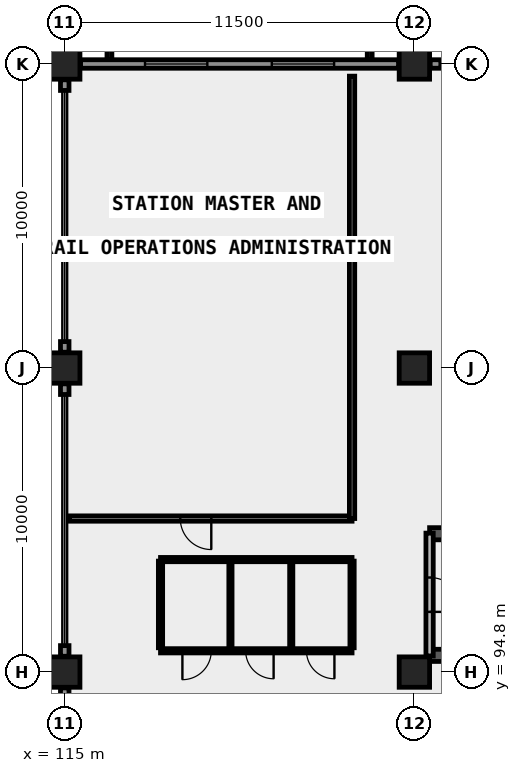
"""IFC4 building model, lengths in metres.
Left out: names, types, materials, properties, quantities, classifications, styles, units other than length and angle.
Written with IfcOpenShell. Run it as: python <this file> out.ifc"""

import sys

from ifc_helpers import new_model, si_unit, direction, frame, frame_2d, origin, origin_2d, place, context, subcontext, project, spatial, rectangle, extrude, element, fill, save


model = new_model("IFC4")
c1 = context("Model", 3, precision=1e-05, world=origin(), true_north=direction((0.0, 1.0)))
c2 = subcontext(c1, "Body", "Model", "MODEL_VIEW")
j1 = project(units=[si_unit("LENGTHUNIT", "METRE"), si_unit("PLANEANGLEUNIT", "RADIAN")], contexts=[c1])
p1 = place(None, origin())
s1 = spatial("IfcSite", under=j1, at=p1, CompositionType="ELEMENT")
p2 = place(p1, origin())
s2 = spatial("IfcBuilding", under=s1, at=p2, CompositionType="ELEMENT")
p3 = place(p2, frame((0.0, 0.0, 13.8)))
s3 = spatial("IfcBuildingStorey", under=s2, at=p3, CompositionType="ELEMENT", Elevation=13.8)
for number, where, z_axis, x_axis in (
    (1, (115.0, 94.8, 0.0), (0.0, 0.0, 1.0), (1.0, 0.0, 0.0)),
    (2, (115.0, 104.8, 0.0), (0.0, 0.0, 1.0), (1.0, 0.0, 0.0)),
    (3, (115.0, 114.8, 0.0), (0.0, 0.0, 1.0), (1.0, 0.0, 0.0)),
    (4, (126.5, 94.8, 0.0), (0.0, 0.0, 1.0), (1.0, 0.0, 0.0)),
    (5, (126.5, 104.8, 0.0), (0.0, 0.0, 1.0), (1.0, 0.0, 0.0)),
    (6, (126.5, 114.8, 0.0), (0.0, 0.0, 1.0), (1.0, 0.0, 0.0)),
):
    element("IfcColumn", number, at=place(p3, frame(where, z_axis=z_axis, x_axis=x_axis)), inside=s3, PredefinedType="COLUMN", context=c2, shape_type="SweptSolid", body=[
        extrude(rectangle(XDim=1.0, YDim=1.0, at=origin_2d()), origin(), (0.0, 0.0, 1.0), 4.5),
    ])
p4 = place(p3, frame((127.0, 95.35, 0.0), z_axis=(0.0, 0.0, 1.0), x_axis=(1.0, 0.0, 0.0)))
e7 = element("IfcWall", 7, at=p4, inside=s3, PredefinedType="SHEAR", context=c2, shape_type="SweptSolid", body=[
    extrude(rectangle(XDim=9.15, YDim=0.4, at=frame_2d((4.575, 0.0))), origin(), (0.0, 0.0, 1.0), 4.5),
])
p5 = place(p3, frame((127.0, 99.35, 0.0), z_axis=(0.0, 0.0, 1.0), x_axis=(1.0, 0.0, 0.0)))
e8 = element("IfcWall", 8, at=p5, inside=s3, PredefinedType="SHEAR", context=c2, shape_type="SweptSolid", body=[
    extrude(rectangle(XDim=9.15, YDim=0.4, at=frame_2d((4.575, 0.0))), origin(), (0.0, 0.0, 1.0), 4.5),
])
p6 = place(p5, frame((0.55, 0.0, 0.0)))
e9 = element("IfcOpeningElement", 9, at=p6, cuts=e8, PredefinedType="OPENING", context=c2, shape_type="SweptSolid", body=[
    extrude(rectangle(XDim=1.13, YDim=2.15, at=frame_2d((0.565, 1.075))), frame((0.0, 0.21, 0.0), z_axis=(0.0, -1.0, 0.0), x_axis=(1.0, 0.0, 0.0)), (0.0, 0.0, 1.0), 0.42),
])
p7 = place(p3, frame((115.52, 114.8, 0.0), z_axis=(0.0, 0.0, 1.0), x_axis=(1.0, 0.0, 0.0)))
e10 = element("IfcWall", 10, at=p7, inside=s3, PredefinedType="SOLIDWALL", context=c2, shape_type="SweptSolid", body=[
    extrude(rectangle(XDim=10.46, YDim=0.28, at=frame_2d((5.23, 0.0))), origin(), (0.0, 0.0, 1.0), 3.45),
])
p8 = place(p7, frame((2.12, 0.0, 0.85)))
e11 = element("IfcOpeningElement", 11, at=p8, cuts=e10, PredefinedType="OPENING", context=c2, shape_type="SweptSolid", body=[
    extrude(rectangle(XDim=2.05, YDim=1.9, at=frame_2d((1.025, 0.95))), frame((0.0, 0.15, 0.0), z_axis=(0.0, -1.0, 0.0), x_axis=(1.0, 0.0, 0.0)), (0.0, 0.0, 1.0), 0.3),
])
p9 = place(p7, frame((6.29, 0.0, 0.85)))
e12 = element("IfcOpeningElement", 12, at=p9, cuts=e10, PredefinedType="OPENING", context=c2, shape_type="SweptSolid", body=[
    extrude(rectangle(XDim=2.05, YDim=1.9, at=frame_2d((1.025, 0.95))), frame((0.0, 0.15, 0.0), z_axis=(0.0, -1.0, 0.0), x_axis=(1.0, 0.0, 0.0)), (0.0, 0.0, 1.0), 0.3),
])
for number, where, z_axis, x_axis in (
    (13, (127.02, 114.8, 0.0), (0.0, 0.0, 1.0), (1.0, 0.0, 0.0)),
    (14, (115.0, 93.93, 0.0), (0.0, 0.0, 1.0), (0.0, 1.0, 0.0)),
):
    element("IfcWall", number, at=place(p3, frame(where, z_axis=z_axis, x_axis=x_axis)), inside=s3, PredefinedType="SOLIDWALL", context=c2, shape_type="SweptSolid", body=[
        extrude(rectangle(XDim=0.35, YDim=0.28, at=frame_2d((0.175, 0.0))), origin(), (0.0, 0.0, 1.0), 4.23),
    ])
p10 = place(p3, frame((115.0, 95.32, 0.0), z_axis=(0.0, 0.0, 1.0), x_axis=(0.0, 1.0, 0.0)))
e15 = element("IfcWall", 15, at=p10, inside=s3, PredefinedType="SOLIDWALL", context=c2, shape_type="SweptSolid", body=[
    extrude(rectangle(XDim=0.35, YDim=0.28, at=frame_2d((0.175, 0.0))), origin(), (0.0, 0.0, 1.0), 4.23),
])
p11 = place(p3, frame((115.0, 103.93, 0.0), z_axis=(0.0, 0.0, 1.0), x_axis=(0.0, 1.0, 0.0)))
e16 = element("IfcWall", 16, at=p11, inside=s3, PredefinedType="SOLIDWALL", context=c2, shape_type="SweptSolid", body=[
    extrude(rectangle(XDim=0.35, YDim=0.28, at=frame_2d((0.175, 0.0))), origin(), (0.0, 0.0, 1.0), 4.23),
])
p12 = place(p3, frame((115.0, 105.32, 0.0), z_axis=(0.0, 0.0, 1.0), x_axis=(0.0, 1.0, 0.0)))
e17 = element("IfcWall", 17, at=p12, inside=s3, PredefinedType="SOLIDWALL", context=c2, shape_type="SweptSolid", body=[
    extrude(rectangle(XDim=0.35, YDim=0.28, at=frame_2d((0.175, 0.0))), origin(), (0.0, 0.0, 1.0), 4.23),
])
p13 = place(p3, frame((115.0, 113.93, 0.0), z_axis=(0.0, 0.0, 1.0), x_axis=(0.0, 1.0, 0.0)))
e18 = element("IfcWall", 18, at=p13, inside=s3, PredefinedType="SOLIDWALL", context=c2, shape_type="SweptSolid", body=[
    extrude(rectangle(XDim=0.35, YDim=0.28, at=frame_2d((0.175, 0.0))), origin(), (0.0, 0.0, 1.0), 4.23),
])
p14 = place(p3, frame((127.0, 95.33, 0.0), z_axis=(0.0, 0.0, 1.0), x_axis=(0.0, 1.0, 0.0)))
e19 = element("IfcWall", 19, at=p14, inside=s3, PredefinedType="SOLIDWALL", context=c2, shape_type="SweptSolid", body=[
    extrude(rectangle(XDim=4.04, YDim=0.24, at=frame_2d((2.02, 0.0))), origin(), (0.0, 0.0, 1.0), 4.22),
])
p15 = place(p14, frame((1.45, 0.0, 0.0)))
e20 = element("IfcOpeningElement", 20, at=p15, cuts=e19, PredefinedType="OPENING", context=c2, shape_type="SweptSolid", body=[
    extrude(rectangle(XDim=1.13, YDim=2.15, at=frame_2d((0.565, 1.075))), frame((0.0, 0.13, 0.0), z_axis=(0.0, -1.0, 0.0), x_axis=(1.0, 0.0, 0.0)), (0.0, 0.0, 1.0), 0.26),
])
p16 = place(p3, frame((118.15, 95.5, 0.0), z_axis=(0.0, 0.0, 1.0), x_axis=(1.0, 0.0, 0.0)))
e21 = element("IfcWall", 21, at=p16, inside=s3, PredefinedType="PLUMBINGWALL", context=c2, shape_type="SweptSolid", body=[
    extrude(rectangle(XDim=6.3, YDim=0.14, at=frame_2d((3.15, 0.0))), origin(), (0.0, 0.0, 1.0), 4.22),
])
p17 = place(p16, frame((0.72, 0.0, 0.0)))
e22 = element("IfcOpeningElement", 22, at=p17, cuts=e21, PredefinedType="OPENING", context=c2, shape_type="SweptSolid", body=[
    extrude(rectangle(XDim=0.95, YDim=2.1, at=frame_2d((0.475, 1.05))), frame((0.0, 0.08, 0.0), z_axis=(0.0, -1.0, 0.0), x_axis=(1.0, 0.0, 0.0)), (0.0, 0.0, 1.0), 0.16),
])
p18 = place(p16, frame((2.8, 0.0, 0.0)))
e23 = element("IfcOpeningElement", 23, at=p18, cuts=e21, PredefinedType="OPENING", context=c2, shape_type="SweptSolid", body=[
    extrude(rectangle(XDim=0.92, YDim=2.1, at=frame_2d((0.46, 1.05))), frame((0.0, 0.08, 0.0), z_axis=(0.0, -1.0, 0.0), x_axis=(1.0, 0.0, 0.0)), (0.0, 0.0, 1.0), 0.16),
])
p19 = place(p16, frame((4.8, 0.0, 0.0)))
e24 = element("IfcOpeningElement", 24, at=p19, cuts=e21, PredefinedType="OPENING", context=c2, shape_type="SweptSolid", body=[
    extrude(rectangle(XDim=0.92, YDim=2.1, at=frame_2d((0.46, 1.05))), frame((0.0, 0.08, 0.0), z_axis=(0.0, -1.0, 0.0), x_axis=(1.0, 0.0, 0.0)), (0.0, 0.0, 1.0), 0.16),
])
p20 = place(p3, frame((118.15, 95.6, 0.0), z_axis=(0.0, 0.0, 1.0), x_axis=(0.0, 1.0, 0.0)))
e25 = element("IfcWall", 25, at=p20, inside=s3, PredefinedType="PLUMBINGWALL", context=c2, shape_type="SweptSolid", body=[
    extrude(rectangle(XDim=2.85, YDim=0.14, at=frame_2d((1.425, 0.0))), origin(), (0.0, 0.0, 1.0), 4.22),
])
for number, where, z_axis, x_axis in (
    (26, (120.45, 95.6, 0.0), (0.0, 0.0, 1.0), (0.0, 1.0, 0.0)),
    (27, (122.45, 95.6, 0.0), (0.0, 0.0, 1.0), (0.0, 1.0, 0.0)),
):
    element("IfcWall", number, at=place(p3, frame(where, z_axis=z_axis, x_axis=x_axis)), inside=s3, PredefinedType="PARTITIONING", context=c2, shape_type="SweptSolid", body=[
        extrude(rectangle(XDim=2.85, YDim=0.105, at=frame_2d((1.425, 0.0))), origin(), (0.0, 0.0, 1.0), 4.22),
    ])
p21 = place(p3, frame((124.45, 95.6, 0.0), z_axis=(0.0, 0.0, 1.0), x_axis=(0.0, 1.0, 0.0)))
e28 = element("IfcWall", 28, at=p21, inside=s3, PredefinedType="PLUMBINGWALL", context=c2, shape_type="SweptSolid", body=[
    extrude(rectangle(XDim=2.85, YDim=0.14, at=frame_2d((1.425, 0.0))), origin(), (0.0, 0.0, 1.0), 4.22),
])
p22 = place(p3, frame((118.15, 98.5, 0.0), z_axis=(0.0, 0.0, 1.0), x_axis=(1.0, 0.0, 0.0)))
e29 = element("IfcWall", 29, at=p22, inside=s3, PredefinedType="PLUMBINGWALL", context=c2, shape_type="SweptSolid", body=[
    extrude(rectangle(XDim=6.3, YDim=0.14, at=frame_2d((3.15, 0.0))), origin(), (0.0, 0.0, 1.0), 4.22),
])
p23 = place(p3, frame((115.16, 99.85, 0.0), z_axis=(0.0, 0.0, 1.0), x_axis=(1.0, 0.0, 0.0)))
e30 = element("IfcWall", 30, at=p23, inside=s3, PredefinedType="PARTITIONING", context=c2, shape_type="SweptSolid", body=[
    extrude(rectangle(XDim=9.29, YDim=0.175, at=frame_2d((4.645, 0.0))), origin(), (0.0, 0.0, 1.0), 4.22),
])
p24 = place(p23, frame((3.64, 0.0, 0.0)))
e31 = element("IfcOpeningElement", 31, at=p24, cuts=e30, PredefinedType="OPENING", context=c2, shape_type="SweptSolid", body=[
    extrude(rectangle(XDim=1.02, YDim=2.15, at=frame_2d((0.51, 1.075))), frame((0.0, 0.098, 0.0), z_axis=(0.0, -1.0, 0.0), x_axis=(1.0, 0.0, 0.0)), (0.0, 0.0, 1.0), 0.195),
])
p25 = place(p3, frame((124.45, 99.85, 0.0), z_axis=(0.0, 0.0, 1.0), x_axis=(0.0, 1.0, 0.0)))
e32 = element("IfcWall", 32, at=p25, inside=s3, PredefinedType="PARTITIONING", context=c2, shape_type="SweptSolid", body=[
    extrude(rectangle(XDim=14.55, YDim=0.175, at=frame_2d((7.275, 0.0))), origin(), (0.0, 0.0, 1.0), 4.22),
])
p26 = place(p8, origin())
e33 = element("IfcWindow", 33, at=p26, inside=s3, PartitioningType="SINGLE_PANEL", PredefinedType="WINDOW", context=c2, shape_type="SweptSolid", body=[
    extrude(rectangle(XDim=2.05, YDim=1.9, at=frame_2d((1.025, 0.95))), frame((0.0, 0.03, 0.0), z_axis=(0.0, -1.0, 0.0), x_axis=(1.0, 0.0, 0.0)), (0.0, 0.0, 1.0), 0.06),
])
fill(e11, e33)
p27 = place(p9, origin())
e34 = element("IfcWindow", 34, at=p27, inside=s3, PartitioningType="SINGLE_PANEL", PredefinedType="WINDOW", context=c2, shape_type="SweptSolid", body=[
    extrude(rectangle(XDim=2.05, YDim=1.9, at=frame_2d((1.025, 0.95))), frame((0.0, 0.03, 0.0), z_axis=(0.0, -1.0, 0.0), x_axis=(1.0, 0.0, 0.0)), (0.0, 0.0, 1.0), 0.06),
])
fill(e12, e34)
p28 = place(p15, frame((0.565, 0.0, 0.0), z_axis=(0.0, 0.0, 1.0), x_axis=(-1.0, 0.0, 0.0)))
e35 = element("IfcDoor", 35, at=p28, inside=s3, OperationType="SINGLE_SWING_LEFT", PredefinedType="DOOR", context=c2, shape_type="SweptSolid", body=[
    extrude(rectangle(XDim=1.13, YDim=2.15, at=frame_2d((0.0, 1.075))), frame((0.0, 0.025, 0.0), z_axis=(0.0, -1.0, 0.0), x_axis=(1.0, 0.0, 0.0)), (0.0, 0.0, 1.0), 0.05),
])
fill(e20, e35)
p29 = place(p17, frame((0.475, 0.0, 0.0), z_axis=(0.0, 0.0, 1.0), x_axis=(-1.0, 0.0, 0.0)))
e36 = element("IfcDoor", 36, at=p29, inside=s3, OperationType="SINGLE_SWING_LEFT", PredefinedType="DOOR", context=c2, shape_type="SweptSolid", body=[
    extrude(rectangle(XDim=0.95, YDim=2.1, at=frame_2d((0.0, 1.05))), frame((0.0, 0.025, 0.0), z_axis=(0.0, -1.0, 0.0), x_axis=(1.0, 0.0, 0.0)), (0.0, 0.0, 1.0), 0.05),
])
fill(e22, e36)
p30 = place(p18, origin())
e37 = element("IfcDoor", 37, at=p30, inside=s3, OperationType="SINGLE_SWING_RIGHT", PredefinedType="DOOR", context=c2, shape_type="SweptSolid", body=[
    extrude(rectangle(XDim=0.92, YDim=2.1, at=frame_2d((0.46, 1.05))), frame((0.0, 0.025, 0.0), z_axis=(0.0, -1.0, 0.0), x_axis=(1.0, 0.0, 0.0)), (0.0, 0.0, 1.0), 0.05),
])
fill(e23, e37)
p31 = place(p19, origin())
e38 = element("IfcDoor", 38, at=p31, inside=s3, OperationType="SINGLE_SWING_RIGHT", PredefinedType="DOOR", context=c2, shape_type="SweptSolid", body=[
    extrude(rectangle(XDim=0.92, YDim=2.1, at=frame_2d((0.46, 1.05))), frame((0.0, 0.025, 0.0), z_axis=(0.0, -1.0, 0.0), x_axis=(1.0, 0.0, 0.0)), (0.0, 0.0, 1.0), 0.05),
])
fill(e24, e38)
p32 = place(p24, origin())
e39 = element("IfcDoor", 39, at=p32, inside=s3, OperationType="SINGLE_SWING_RIGHT", PredefinedType="DOOR", context=c2, shape_type="SweptSolid", body=[
    extrude(rectangle(XDim=1.02, YDim=2.15, at=frame_2d((0.51, 1.075))), frame((0.0, 0.025, 0.0), z_axis=(0.0, -1.0, 0.0), x_axis=(1.0, 0.0, 0.0)), (0.0, 0.0, 1.0), 0.05),
])
fill(e31, e39)
save(model, sys.argv[1])
